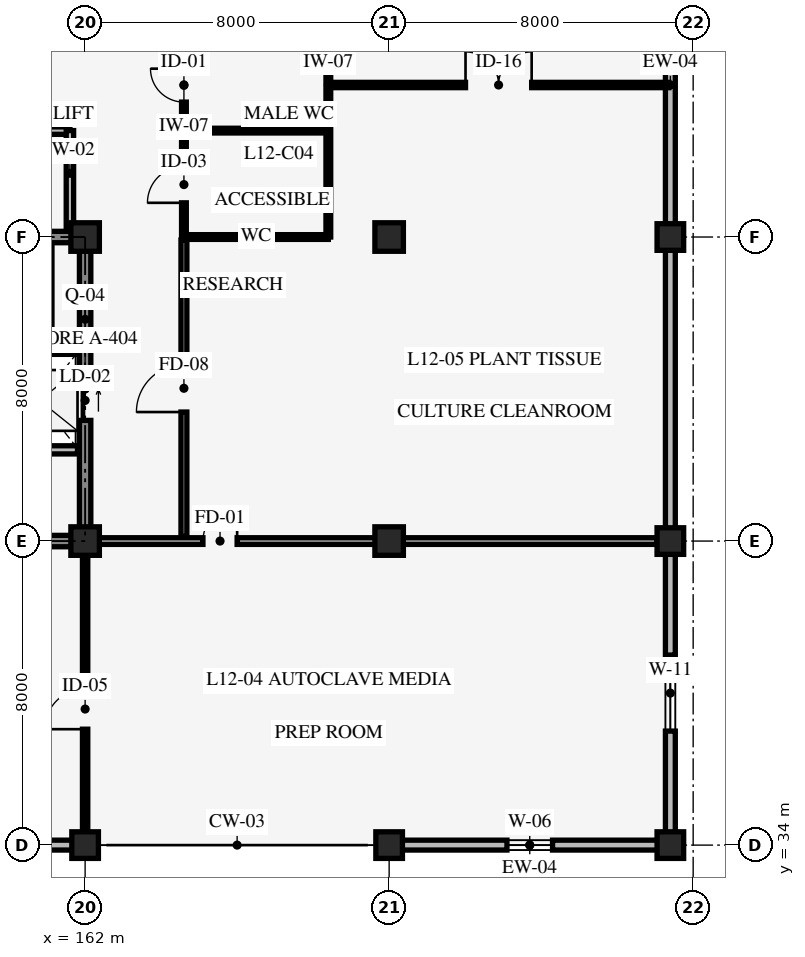
"""IFC4 building model, lengths in metres.
Left out: names, types, materials, properties, quantities, classifications, styles, units other than length and angle.
Written with IfcOpenShell. Run it as: python <this file> out.ifc"""

import sys

from ifc_helpers import new_model, si_unit, direction, frame, frame_2d, origin, origin_2d, place, context, subcontext, project, spatial, rectangle, extrude, element, fill, save


model = new_model("IFC4")
c1 = context("Model", 3, precision=1e-05, world=origin(), true_north=direction((0.0, 1.0)))
c2 = subcontext(c1, "Body", "Model", "MODEL_VIEW")
j1 = project(units=[si_unit("LENGTHUNIT", "METRE"), si_unit("PLANEANGLEUNIT", "RADIAN")], contexts=[c1])
p1 = place(None, origin())
s1 = spatial("IfcSite", under=j1, at=p1, CompositionType="ELEMENT")
p2 = place(p1, origin())
s2 = spatial("IfcBuilding", under=s1, at=p2, CompositionType="ELEMENT")
p3 = place(p2, frame((0.0, 0.0, 48.6)))
s3 = spatial("IfcBuildingStorey", under=s2, at=p3, CompositionType="ELEMENT", Elevation=48.6)
p4 = place(p3, frame((154.0, 42.0, 0.0), z_axis=(0.0, 0.0, 1.0), x_axis=(1.0, 0.0, 0.0)))
e1 = element("IfcWall", 1, at=p4, inside=s3, PredefinedType="SHEAR", context=c2, shape_type="SweptSolid", body=[
    extrude(rectangle(XDim=8.0, YDim=0.3, at=frame_2d((4.0, 0.0))), origin(), (0.0, 0.0, 1.0), 3.95),
])
p5 = place(p3, frame((162.0, 42.0, 0.0), z_axis=(0.0, 0.0, 1.0), x_axis=(0.0, 1.0, 0.0)))
e2 = element("IfcWall", 2, at=p5, inside=s3, PredefinedType="SHEAR", context=c2, shape_type="SweptSolid", body=[
    extrude(rectangle(XDim=8.0, YDim=0.3, at=frame_2d((4.0, 0.0))), origin(), (0.0, 0.0, 1.0), 3.95),
])
p6 = place(p5, frame((3.175, 0.0, 0.0)))
e3 = element("IfcOpeningElement", 3, at=p6, cuts=e2, PredefinedType="OPENING", context=c2, shape_type="SweptSolid", body=[
    extrude(rectangle(XDim=1.05, YDim=2.2, at=frame_2d((0.525, 1.1))), frame((0.0, 0.16, 0.0), z_axis=(0.0, -1.0, 0.0), x_axis=(1.0, 0.0, 0.0)), (0.0, 0.0, 1.0), 0.32),
])
p7 = place(p3, frame((162.0, 50.0, 0.0), z_axis=(0.0, 0.0, 1.0), x_axis=(-1.0, 0.0, 0.0)))
e4 = element("IfcWall", 4, at=p7, inside=s3, PredefinedType="SHEAR", context=c2, shape_type="SweptSolid", body=[
    extrude(rectangle(XDim=8.0, YDim=0.3, at=frame_2d((4.0, 0.0))), origin(), (0.0, 0.0, 1.0), 3.95),
])
p8 = place(p7, frame((5.3, 0.0, 0.0)))
e5 = element("IfcOpeningElement", 5, at=p8, cuts=e4, PredefinedType="OPENING", context=c2, shape_type="SweptSolid", body=[
    extrude(rectangle(XDim=1.3, YDim=2.15, at=frame_2d((0.65, 1.075))), frame((0.0, 0.16, 0.0), z_axis=(0.0, -1.0, 0.0), x_axis=(1.0, 0.0, 0.0)), (0.0, 0.0, 1.0), 0.32),
])
p9 = place(p7, frame((1.45, 0.0, 0.0)))
e6 = element("IfcOpeningElement", 6, at=p9, cuts=e4, PredefinedType="OPENING", context=c2, shape_type="SweptSolid", body=[
    extrude(rectangle(XDim=1.1, YDim=2.2, at=frame_2d((0.55, 1.1))), frame((0.0, 0.16, 0.0), z_axis=(0.0, -1.0, 0.0), x_axis=(1.0, 0.0, 0.0)), (0.0, 0.0, 1.0), 0.32),
])
p10 = place(p3, frame((162.0, 34.0, 0.0), z_axis=(0.0, 0.0, 1.0), x_axis=(1.0, 0.0, 0.0)))
e7 = element("IfcColumn", 7, at=p10, inside=s3, PredefinedType="COLUMN", context=c2, shape_type="SweptSolid", body=[
    extrude(rectangle(XDim=0.7, YDim=0.7, at=origin_2d()), origin(), (0.0, 0.0, 1.0), 4.2),
])
for number, where, z_axis, x_axis in (
    (8, (162.0, 42.0, 0.0), (0.0, 0.0, 1.0), (1.0, 0.0, 0.0)),
    (9, (162.0, 50.0, 0.0), (0.0, 0.0, 1.0), (1.0, 0.0, 0.0)),
):
    element("IfcColumn", number, at=place(p3, frame(where, z_axis=z_axis, x_axis=x_axis)), inside=s3, PredefinedType="COLUMN", context=c2, shape_type="SweptSolid", body=[
        extrude(rectangle(XDim=0.75, YDim=0.75, at=origin_2d()), origin(), (0.0, 0.0, 1.0), 4.2),
    ])
p11 = place(p3, frame((170.0, 34.0, 0.0), z_axis=(0.0, 0.0, 1.0), x_axis=(1.0, 0.0, 0.0)))
e10 = element("IfcColumn", 10, at=p11, inside=s3, PredefinedType="COLUMN", context=c2, shape_type="SweptSolid", body=[
    extrude(rectangle(XDim=0.7, YDim=0.7, at=origin_2d()), origin(), (0.0, 0.0, 1.0), 4.2),
])
for number, where, z_axis, x_axis in (
    (11, (170.0, 42.0, 0.0), (0.0, 0.0, 1.0), (1.0, 0.0, 0.0)),
    (12, (170.0, 50.0, 0.0), (0.0, 0.0, 1.0), (1.0, 0.0, 0.0)),
):
    element("IfcColumn", number, at=place(p3, frame(where, z_axis=z_axis, x_axis=x_axis)), inside=s3, PredefinedType="COLUMN", context=c2, shape_type="SweptSolid", body=[
        extrude(rectangle(XDim=0.75, YDim=0.75, at=origin_2d()), origin(), (0.0, 0.0, 1.0), 4.2),
    ])
for number, where, z_axis, x_axis in (
    (13, (177.4, 34.0, 0.0), (0.0, 0.0, 1.0), (1.0, 0.0, 0.0)),
    (14, (177.4, 42.0, 0.0), (0.0, 0.0, 1.0), (1.0, 0.0, 0.0)),
    (15, (177.4, 50.0, 0.0), (0.0, 0.0, 1.0), (1.0, 0.0, 0.0)),
):
    element("IfcColumn", number, at=place(p3, frame(where, z_axis=z_axis, x_axis=x_axis)), inside=s3, PredefinedType="COLUMN", context=c2, shape_type="SweptSolid", body=[
        extrude(rectangle(XDim=0.7, YDim=0.7, at=origin_2d()), origin(), (0.0, 0.0, 1.0), 4.2),
    ])
p12 = place(p3, frame((177.4, 34.0, 0.0), z_axis=(0.0, 0.0, 1.0), x_axis=(-1.0, 0.0, 0.0)))
e16 = element("IfcWall", 16, at=p12, inside=s3, PredefinedType="STANDARD", context=c2, shape_type="SweptSolid", body=[
    extrude(rectangle(XDim=7.4, YDim=0.26, at=frame_2d((3.7, 0.0))), origin(), (0.0, 0.0, 1.0), 3.19),
])
p13 = place(p12, frame((3.1, 0.0, 0.85)))
e17 = element("IfcOpeningElement", 17, at=p13, cuts=e16, PredefinedType="OPENING", context=c2, shape_type="SweptSolid", body=[
    extrude(rectangle(XDim=1.2, YDim=1.2, at=frame_2d((0.6, 0.6))), frame((0.0, 0.14, 0.0), z_axis=(0.0, -1.0, 0.0), x_axis=(1.0, 0.0, 0.0)), (0.0, 0.0, 1.0), 0.28),
])
p14 = place(p3, frame((162.0, 34.0, 0.0), z_axis=(0.0, 0.0, 1.0), x_axis=(-1.0, 0.0, 0.0)))
e18 = element("IfcWall", 18, at=p14, inside=s3, PredefinedType="STANDARD", context=c2, shape_type="SweptSolid", body=[
    extrude(rectangle(XDim=8.0, YDim=0.26, at=frame_2d((4.0, 0.0))), origin(), (0.0, 0.0, 1.0), 3.19),
])
p15 = place(p14, frame((3.4, 0.0, 0.85)))
e19 = element("IfcOpeningElement", 19, at=p15, cuts=e18, PredefinedType="OPENING", context=c2, shape_type="SweptSolid", body=[
    extrude(rectangle(XDim=1.2, YDim=1.2, at=frame_2d((0.6, 0.6))), frame((0.0, 0.14, 0.0), z_axis=(0.0, -1.0, 0.0), x_axis=(1.0, 0.0, 0.0)), (0.0, 0.0, 1.0), 0.28),
])
p16 = place(p3, frame((177.4, 58.0, 0.0), z_axis=(0.0, 0.0, 1.0), x_axis=(0.0, -1.0, 0.0)))
e20 = element("IfcWall", 20, at=p16, inside=s3, PredefinedType="STANDARD", context=c2, shape_type="SweptSolid", body=[
    extrude(rectangle(XDim=8.0, YDim=0.26, at=frame_2d((4.0, 0.0))), origin(), (0.0, 0.0, 1.0), 3.24),
])
p17 = place(p16, frame((1.4, 0.0, 0.85)))
e21 = element("IfcOpeningElement", 21, at=p17, cuts=e20, PredefinedType="OPENING", context=c2, shape_type="SweptSolid", body=[
    extrude(rectangle(XDim=2.2, YDim=1.4, at=frame_2d((1.1, 0.7))), frame((0.0, 0.14, 0.0), z_axis=(0.0, -1.0, 0.0), x_axis=(1.0, 0.0, 0.0)), (0.0, 0.0, 1.0), 0.28),
])
p18 = place(p3, frame((177.4, 50.0, 0.0), z_axis=(0.0, 0.0, 1.0), x_axis=(0.0, -1.0, 0.0)))
e22 = element("IfcWall", 22, at=p18, inside=s3, PredefinedType="STANDARD", context=c2, shape_type="SweptSolid", body=[
    extrude(rectangle(XDim=8.0, YDim=0.26, at=frame_2d((4.0, 0.0))), origin(), (0.0, 0.0, 1.0), 3.24),
])
p19 = place(p3, frame((177.4, 42.0, 0.0), z_axis=(0.0, 0.0, 1.0), x_axis=(0.0, -1.0, 0.0)))
e23 = element("IfcWall", 23, at=p19, inside=s3, PredefinedType="STANDARD", context=c2, shape_type="SweptSolid", body=[
    extrude(rectangle(XDim=8.0, YDim=0.26, at=frame_2d((4.0, 0.0))), origin(), (0.0, 0.0, 1.0), 3.24),
])
p20 = place(p19, frame((3.0, 0.0, 0.85)))
e24 = element("IfcOpeningElement", 24, at=p20, cuts=e23, PredefinedType="OPENING", context=c2, shape_type="SweptSolid", body=[
    extrude(rectangle(XDim=2.0, YDim=1.5, at=frame_2d((1.0, 0.75))), frame((0.0, 0.14, 0.0), z_axis=(0.0, -1.0, 0.0), x_axis=(1.0, 0.0, 0.0)), (0.0, 0.0, 1.0), 0.28),
])
p21 = place(p3, frame((158.45, 47.02, 0.0), z_axis=(0.0, 0.0, 1.0), x_axis=(1.0, 0.0, 0.0)))
e25 = element("IfcWall", 25, at=p21, inside=s3, PredefinedType="STANDARD", context=c2, shape_type="SweptSolid", body=[
    extrude(rectangle(XDim=3.35, YDim=0.215, at=frame_2d((1.675, 0.0))), origin(), (0.0, 0.0, 1.0), 3.9),
])
p22 = place(p3, frame((159.78, 44.4, 0.0), z_axis=(0.0, 0.0, 1.0), x_axis=(1.0, 0.0, 0.0)))
e26 = element("IfcWall", 26, at=p22, inside=s3, PredefinedType="STANDARD", context=c2, shape_type="SweptSolid", body=[
    extrude(rectangle(XDim=2.02, YDim=0.215, at=frame_2d((1.01, 0.0))), origin(), (0.0, 0.0, 1.0), 3.9),
])
p23 = place(p3, frame((154.0, 52.8, 0.0), z_axis=(0.0, 0.0, 1.0), x_axis=(1.0, 0.0, 0.0)))
e27 = element("IfcWall", 27, at=p23, inside=s3, PredefinedType="STANDARD", context=c2, shape_type="SweptSolid", body=[
    extrude(rectangle(XDim=7.6, YDim=0.195, at=frame_2d((3.8, 0.0))), origin(), (0.0, 0.0, 1.0), 3.9),
])
p24 = place(p23, frame((2.8, 0.0, 0.0)))
e28 = element("IfcOpeningElement", 28, at=p24, cuts=e27, PredefinedType="OPENING", context=c2, shape_type="SweptSolid", body=[
    extrude(rectangle(XDim=1.2, YDim=2.1, at=frame_2d((0.6, 1.05))), frame((0.0, 0.107, 0.0), z_axis=(0.0, -1.0, 0.0), x_axis=(1.0, 0.0, 0.0)), (0.0, 0.0, 1.0), 0.215),
])
p25 = place(p3, frame((161.6, 50.15, 0.0), z_axis=(0.0, 0.0, 1.0), x_axis=(0.0, 1.0, 0.0)))
e29 = element("IfcWall", 29, at=p25, inside=s3, PredefinedType="STANDARD", context=c2, shape_type="SweptSolid", body=[
    extrude(rectangle(XDim=2.65, YDim=0.195, at=frame_2d((1.325, 0.0))), origin(), (0.0, 0.0, 1.0), 3.24),
])
p26 = place(p3, frame((164.6, 50.0, 0.0), z_axis=(0.0, 0.0, 1.0), x_axis=(0.0, 1.0, 0.0)))
e30 = element("IfcWall", 30, at=p26, inside=s3, PredefinedType="STANDARD", context=c2, shape_type="SweptSolid", body=[
    extrude(rectangle(XDim=8.0, YDim=0.125, at=frame_2d((4.0, 0.0))), origin(), (0.0, 0.0, 1.0), 3.9),
])
p27 = place(p26, frame((0.9, 0.0, 0.0)))
e31 = element("IfcOpeningElement", 31, at=p27, cuts=e30, PredefinedType="OPENING", context=c2, shape_type="SweptSolid", body=[
    extrude(rectangle(XDim=0.96, YDim=2.08, at=frame_2d((0.48, 1.04))), frame((0.0, 0.073, 0.0), z_axis=(0.0, -1.0, 0.0), x_axis=(1.0, 0.0, 0.0)), (0.0, 0.0, 1.0), 0.145),
])
p28 = place(p26, frame((3.55, 0.0, 0.0)))
e32 = element("IfcOpeningElement", 32, at=p28, cuts=e30, PredefinedType="OPENING", context=c2, shape_type="SweptSolid", body=[
    extrude(rectangle(XDim=0.88, YDim=2.05, at=frame_2d((0.44, 1.025))), frame((0.0, 0.073, 0.0), z_axis=(0.0, -1.0, 0.0), x_axis=(1.0, 0.0, 0.0)), (0.0, 0.0, 1.0), 0.145),
])
p29 = place(p26, frame((6.15, 0.0, 0.0)))
e33 = element("IfcOpeningElement", 33, at=p29, cuts=e30, PredefinedType="OPENING", context=c2, shape_type="SweptSolid", body=[
    extrude(rectangle(XDim=0.92, YDim=2.05, at=frame_2d((0.46, 1.025))), frame((0.0, 0.073, 0.0), z_axis=(0.0, -1.0, 0.0), x_axis=(1.0, 0.0, 0.0)), (0.0, 0.0, 1.0), 0.145),
])
p30 = place(p3, frame((168.4, 50.0, 0.0), z_axis=(0.0, 0.0, 1.0), x_axis=(0.0, 1.0, 0.0)))
e34 = element("IfcWall", 34, at=p30, inside=s3, PredefinedType="STANDARD", context=c2, shape_type="SweptSolid", body=[
    extrude(rectangle(XDim=8.0, YDim=0.125, at=frame_2d((4.0, 0.0))), origin(), (0.0, 0.0, 1.0), 3.9),
])
p31 = place(p3, frame((164.6, 50.0, 0.0), z_axis=(0.0, 0.0, 1.0), x_axis=(1.0, 0.0, 0.0)))
e35 = element("IfcWall", 35, at=p31, inside=s3, PredefinedType="STANDARD", context=c2, shape_type="SweptSolid", body=[
    extrude(rectangle(XDim=3.8, YDim=0.125, at=frame_2d((1.9, 0.0))), origin(), (0.0, 0.0, 1.0), 3.19),
])
p32 = place(p3, frame((164.6, 52.8, 0.0), z_axis=(0.0, 0.0, 1.0), x_axis=(1.0, 0.0, 0.0)))
e36 = element("IfcWall", 36, at=p32, inside=s3, PredefinedType="STANDARD", context=c2, shape_type="SweptSolid", body=[
    extrude(rectangle(XDim=3.8, YDim=0.125, at=frame_2d((1.9, 0.0))), origin(), (0.0, 0.0, 1.0), 3.9),
])
p33 = place(p3, frame((164.6, 42.12, 0.0), z_axis=(0.0, 0.0, 1.0), x_axis=(0.0, 1.0, 0.0)))
e37 = element("IfcWall", 37, at=p33, inside=s3, PredefinedType="STANDARD", context=c2, shape_type="SweptSolid", body=[
    extrude(rectangle(XDim=7.8, YDim=0.155, at=frame_2d((3.9, 0.0))), origin(), (0.0, 0.0, 1.0), 3.9),
])
p34 = place(p33, frame((3.275, 0.0, 0.0)))
e38 = element("IfcOpeningElement", 38, at=p34, cuts=e37, PredefinedType="OPENING", context=c2, shape_type="SweptSolid", body=[
    extrude(rectangle(XDim=1.25, YDim=2.15, at=frame_2d((0.625, 1.075))), frame((0.0, 0.087, 0.0), z_axis=(0.0, -1.0, 0.0), x_axis=(1.0, 0.0, 0.0)), (0.0, 0.0, 1.0), 0.175),
])
p35 = place(p3, frame((168.4, 54.0, 0.0), z_axis=(0.0, 0.0, 1.0), x_axis=(1.0, 0.0, 0.0)))
e39 = element("IfcWall", 39, at=p35, inside=s3, PredefinedType="STANDARD", context=c2, shape_type="SweptSolid", body=[
    extrude(rectangle(XDim=8.96, YDim=0.14, at=frame_2d((4.48, 0.0))), origin(), (0.0, 0.0, 1.0), 3.9),
])
p36 = place(p35, frame((3.61, 0.0, 0.0)))
e40 = element("IfcOpeningElement", 40, at=p36, cuts=e39, PredefinedType="OPENING", context=c2, shape_type="SweptSolid", body=[
    extrude(rectangle(XDim=1.74, YDim=2.26, at=frame_2d((0.87, 1.13))), frame((0.0, 0.08, 0.0), z_axis=(0.0, -1.0, 0.0), x_axis=(1.0, 0.0, 0.0)), (0.0, 0.0, 1.0), 0.16),
])
p37 = place(p3, frame((162.0, 34.05, 0.0), z_axis=(0.0, 0.0, 1.0), x_axis=(0.0, 1.0, 0.0)))
e41 = element("IfcWall", 41, at=p37, inside=s3, PredefinedType="STANDARD", context=c2, shape_type="SweptSolid", body=[
    extrude(rectangle(XDim=7.83, YDim=0.14, at=frame_2d((3.915, 0.0))), origin(), (0.0, 0.0, 1.0), 3.24),
])
p38 = place(p37, frame((3.0, 0.0, 0.0)))
e42 = element("IfcOpeningElement", 42, at=p38, cuts=e41, PredefinedType="OPENING", context=c2, shape_type="SweptSolid", body=[
    extrude(rectangle(XDim=1.06, YDim=2.12, at=frame_2d((0.53, 1.06))), frame((0.0, 0.08, 0.0), z_axis=(0.0, -1.0, 0.0), x_axis=(1.0, 0.0, 0.0)), (0.0, 0.0, 1.0), 0.16),
])
p39 = place(p3, frame((162.35, 42.0, 0.0), z_axis=(0.0, 0.0, 1.0), x_axis=(1.0, 0.0, 0.0)))
e43 = element("IfcWall", 43, at=p39, inside=s3, PredefinedType="STANDARD", context=c2, shape_type="SweptSolid", body=[
    extrude(rectangle(XDim=14.7, YDim=0.175, at=frame_2d((7.35, 0.0))), origin(), (0.0, 0.0, 1.0), 3.19),
])
p40 = place(p39, frame((2.75, 0.0, 0.0)))
e44 = element("IfcOpeningElement", 44, at=p40, cuts=e43, PredefinedType="OPENING", context=c2, shape_type="SweptSolid", body=[
    extrude(rectangle(XDim=0.9, YDim=2.1, at=frame_2d((0.45, 1.05))), frame((0.0, 0.098, 0.0), z_axis=(0.0, -1.0, 0.0), x_axis=(1.0, 0.0, 0.0)), (0.0, 0.0, 1.0), 0.195),
])
p41 = place(p13, origin())
e45 = element("IfcWindow", 45, at=p41, inside=s3, PartitioningType="SINGLE_PANEL", PredefinedType="WINDOW", context=c2, shape_type="SweptSolid", body=[
    extrude(rectangle(XDim=1.2, YDim=1.2, at=frame_2d((0.6, 0.6))), frame((0.0, 0.03, 0.0), z_axis=(0.0, -1.0, 0.0), x_axis=(1.0, 0.0, 0.0)), (0.0, 0.0, 1.0), 0.06),
])
fill(e17, e45)
p42 = place(p17, origin())
e46 = element("IfcWindow", 46, at=p42, inside=s3, PartitioningType="SINGLE_PANEL", PredefinedType="WINDOW", context=c2, shape_type="SweptSolid", body=[
    extrude(rectangle(XDim=2.2, YDim=1.4, at=frame_2d((1.1, 0.7))), frame((0.0, 0.03, 0.0), z_axis=(0.0, -1.0, 0.0), x_axis=(1.0, 0.0, 0.0)), (0.0, 0.0, 1.0), 0.06),
])
fill(e21, e46)
p43 = place(p20, origin())
e47 = element("IfcWindow", 47, at=p43, inside=s3, PartitioningType="SINGLE_PANEL", PredefinedType="WINDOW", context=c2, shape_type="SweptSolid", body=[
    extrude(rectangle(XDim=2.0, YDim=1.5, at=frame_2d((1.0, 0.75))), frame((0.0, 0.03, 0.0), z_axis=(0.0, -1.0, 0.0), x_axis=(1.0, 0.0, 0.0)), (0.0, 0.0, 1.0), 0.06),
])
fill(e24, e47)
p44 = place(p6, origin())
e48 = element("IfcDoor", 48, at=p44, inside=s3, OperationType="SLIDING_TO_LEFT", PredefinedType="DOOR", context=c2, shape_type="SweptSolid", body=[
    extrude(rectangle(XDim=1.05, YDim=2.2, at=frame_2d((0.525, 1.1))), frame((0.0, 0.025, 0.0), z_axis=(0.0, -1.0, 0.0), x_axis=(1.0, 0.0, 0.0)), (0.0, 0.0, 1.0), 0.05),
])
fill(e3, e48)
p45 = place(p27, origin())
e49 = element("IfcDoor", 49, at=p45, inside=s3, OperationType="SINGLE_SWING_LEFT", PredefinedType="DOOR", context=c2, shape_type="SweptSolid", body=[
    extrude(rectangle(XDim=0.96, YDim=2.08, at=frame_2d((0.48, 1.04))), frame((0.0, 0.025, 0.0), z_axis=(0.0, -1.0, 0.0), x_axis=(1.0, 0.0, 0.0)), (0.0, 0.0, 1.0), 0.05),
])
fill(e31, e49)
p46 = place(p28, origin())
e50 = element("IfcDoor", 50, at=p46, inside=s3, OperationType="SINGLE_SWING_RIGHT", PredefinedType="DOOR", context=c2, shape_type="SweptSolid", body=[
    extrude(rectangle(XDim=0.88, YDim=2.05, at=frame_2d((0.44, 1.025))), frame((0.0, 0.025, 0.0), z_axis=(0.0, -1.0, 0.0), x_axis=(1.0, 0.0, 0.0)), (0.0, 0.0, 1.0), 0.05),
])
fill(e32, e50)
p47 = place(p34, origin())
e51 = element("IfcDoor", 51, at=p47, inside=s3, OperationType="SINGLE_SWING_LEFT", PredefinedType="DOOR", context=c2, shape_type="SweptSolid", body=[
    extrude(rectangle(XDim=1.25, YDim=2.15, at=frame_2d((0.625, 1.075))), frame((0.0, 0.025, 0.0), z_axis=(0.0, -1.0, 0.0), x_axis=(1.0, 0.0, 0.0)), (0.0, 0.0, 1.0), 0.05),
])
fill(e38, e51)
p48 = place(p36, origin())
e52 = element("IfcDoor", 52, at=p48, inside=s3, OperationType="DOUBLE_DOOR_SINGLE_SWING", PredefinedType="DOOR", context=c2, shape_type="SweptSolid", body=[
    extrude(rectangle(XDim=1.74, YDim=2.26, at=frame_2d((0.87, 1.13))), frame((0.0, 0.025, 0.0), z_axis=(0.0, -1.0, 0.0), x_axis=(1.0, 0.0, 0.0)), (0.0, 0.0, 1.0), 0.05),
])
fill(e40, e52)
p49 = place(p38, origin())
e53 = element("IfcDoor", 53, at=p49, inside=s3, OperationType="SINGLE_SWING_LEFT", PredefinedType="DOOR", context=c2, shape_type="SweptSolid", body=[
    extrude(rectangle(XDim=1.06, YDim=2.12, at=frame_2d((0.53, 1.06))), frame((0.0, 0.025, 0.0), z_axis=(0.0, -1.0, 0.0), x_axis=(1.0, 0.0, 0.0)), (0.0, 0.0, 1.0), 0.05),
])
fill(e42, e53)
p50 = place(p40, origin())
e54 = element("IfcDoor", 54, at=p50, inside=s3, OperationType="SINGLE_SWING_RIGHT", PredefinedType="DOOR", context=c2, shape_type="SweptSolid", body=[
    extrude(rectangle(XDim=0.9, YDim=2.1, at=frame_2d((0.45, 1.05))), frame((0.0, 0.025, 0.0), z_axis=(0.0, -1.0, 0.0), x_axis=(1.0, 0.0, 0.0)), (0.0, 0.0, 1.0), 0.05),
])
fill(e44, e54)
save(model, sys.argv[1])
